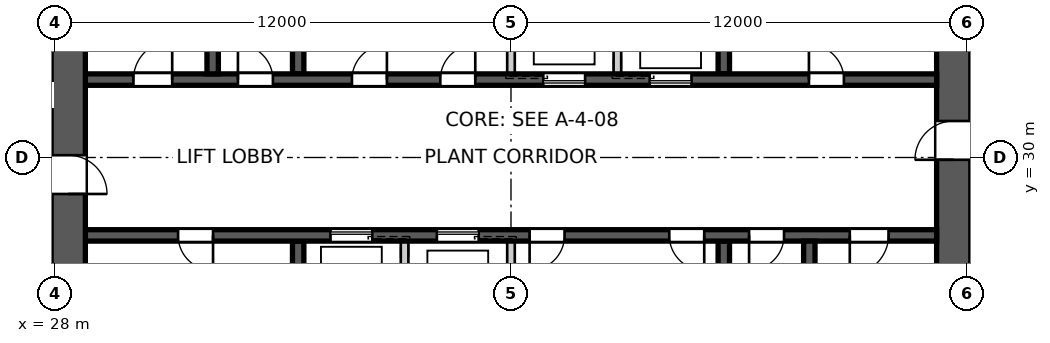
"""IFC4 building model, lengths in metres.
Left out: names, types, materials, properties, quantities, classifications, styles, units other than length and angle.
Written with IfcOpenShell. Run it as: python <this file> out.ifc"""

import sys

from ifc_helpers import new_model, si_unit, direction, frame, frame_2d, origin, place, context, subcontext, project, spatial, polyline, rectangle, outline, extrude, element, fill, save


model = new_model("IFC4")
c1 = context("Model", 3, precision=1e-05, world=origin(), true_north=direction((0.0, 1.0)))
c2 = subcontext(c1, "Body", "Model", "MODEL_VIEW")
j1 = project(units=[si_unit("LENGTHUNIT", "METRE"), si_unit("PLANEANGLEUNIT", "RADIAN")], contexts=[c1])
p1 = place(None, origin())
s1 = spatial("IfcSite", under=j1, at=p1, CompositionType="ELEMENT")
p2 = place(p1, origin())
s2 = spatial("IfcBuilding", under=s1, at=p2, CompositionType="ELEMENT")
p3 = place(p2, frame((0.0, 0.0, 235.4)))
s3 = spatial("IfcBuildingStorey", under=s2, at=p3, CompositionType="ELEMENT", Elevation=235.4)
p4 = place(p3, frame((51.65, 18.8, 0.0), z_axis=(0.0, 0.0, 1.0), x_axis=(0.0, 1.0, 0.0)))
e1 = element("IfcWall", 1, at=p4, inside=s3, PredefinedType="SHEAR", context=c2, shape_type="SweptSolid", body=[
    extrude(outline(polyline([(0.0, -0.45), (22.4, -0.45), (22.4, -0.025), (22.85, -0.025), (22.85, 0.025), (22.4, 0.025), (22.4, 0.45), (0.0, 0.45), (0.0, 0.025), (-0.45, 0.025), (-0.45, -0.025), (0.0, -0.025), (0.0, -0.45)])), origin(), (0.0, 0.0, 1.0), 5.0),
])
p5 = place(p4, frame((11.14, 0.0, 0.0)))
e2 = element("IfcOpeningElement", 2, at=p5, cuts=e1, PredefinedType="OPENING", context=c2, shape_type="SweptSolid", body=[
    extrude(rectangle(XDim=1.02, YDim=2.4, at=frame_2d((0.51, 1.2))), frame((0.0, 0.46, 0.0), z_axis=(0.0, -1.0, 0.0), x_axis=(1.0, 0.0, 0.0)), (0.0, 0.0, 1.0), 0.92),
])
p6 = place(p3, frame((28.35, 41.2, 0.0), z_axis=(0.0, 0.0, 1.0), x_axis=(0.0, -1.0, 0.0)))
e3 = element("IfcWall", 3, at=p6, inside=s3, PredefinedType="SHEAR", context=c2, shape_type="SweptSolid", body=[
    extrude(outline(polyline([(0.0, -0.45), (22.4, -0.45), (22.4, -0.025), (22.85, -0.025), (22.85, 0.025), (22.4, 0.025), (22.4, 0.45), (0.0, 0.45), (0.0, 0.025), (-0.45, 0.025), (-0.45, -0.025), (0.0, -0.025), (0.0, -0.45)])), origin(), (0.0, 0.0, 1.0), 5.0),
])
p7 = place(p6, frame((11.14, 0.0, 0.0)))
e4 = element("IfcOpeningElement", 4, at=p7, cuts=e3, PredefinedType="OPENING", context=c2, shape_type="SweptSolid", body=[
    extrude(rectangle(XDim=1.02, YDim=2.4, at=frame_2d((0.51, 1.2))), frame((0.0, 0.46, 0.0), z_axis=(0.0, -1.0, 0.0), x_axis=(1.0, 0.0, 0.0)), (0.0, 0.0, 1.0), 0.92),
])
p8 = place(p3, frame((28.8, 32.05, 0.0), z_axis=(0.0, 0.0, 1.0), x_axis=(1.0, 0.0, 0.0)))
e5 = element("IfcWall", 5, at=p8, inside=s3, PredefinedType="SHEAR", context=c2, shape_type="SweptSolid", body=[
    extrude(rectangle(XDim=22.4, YDim=0.3, at=frame_2d((11.2, 0.0))), origin(), (0.0, 0.0, 1.0), 5.0),
])
p9 = place(p8, frame((19.04, 0.0, 0.0)))
e6 = element("IfcOpeningElement", 6, at=p9, cuts=e5, PredefinedType="OPENING", context=c2, shape_type="SweptSolid", body=[
    extrude(rectangle(XDim=0.92, YDim=2.1, at=frame_2d((0.46, 1.05))), frame((0.0, 0.16, 0.0), z_axis=(0.0, -1.0, 0.0), x_axis=(1.0, 0.0, 0.0)), (0.0, 0.0, 1.0), 0.32),
])
p10 = place(p8, frame((1.265, 0.0, 0.0)))
e7 = element("IfcOpeningElement", 7, at=p10, cuts=e5, PredefinedType="OPENING", context=c2, shape_type="SweptSolid", body=[
    extrude(rectangle(XDim=1.02, YDim=2.1, at=frame_2d((0.51, 1.05))), frame((0.0, 0.16, 0.0), z_axis=(0.0, -1.0, 0.0), x_axis=(1.0, 0.0, 0.0)), (0.0, 0.0, 1.0), 0.32),
])
p11 = place(p8, frame((4.015, 0.0, 0.0)))
e8 = element("IfcOpeningElement", 8, at=p11, cuts=e5, PredefinedType="OPENING", context=c2, shape_type="SweptSolid", body=[
    extrude(rectangle(XDim=0.92, YDim=2.1, at=frame_2d((0.46, 1.05))), frame((0.0, 0.16, 0.0), z_axis=(0.0, -1.0, 0.0), x_axis=(1.0, 0.0, 0.0)), (0.0, 0.0, 1.0), 0.32),
])
p12 = place(p8, frame((7.015, 0.0, 0.0)))
e9 = element("IfcOpeningElement", 9, at=p12, cuts=e5, PredefinedType="OPENING", context=c2, shape_type="SweptSolid", body=[
    extrude(rectangle(XDim=0.92, YDim=2.1, at=frame_2d((0.46, 1.05))), frame((0.0, 0.16, 0.0), z_axis=(0.0, -1.0, 0.0), x_axis=(1.0, 0.0, 0.0)), (0.0, 0.0, 1.0), 0.32),
])
p13 = place(p8, frame((9.34, 0.0, 0.0)))
e10 = element("IfcOpeningElement", 10, at=p13, cuts=e5, PredefinedType="OPENING", context=c2, shape_type="SweptSolid", body=[
    extrude(rectangle(XDim=0.92, YDim=2.1, at=frame_2d((0.46, 1.05))), frame((0.0, 0.16, 0.0), z_axis=(0.0, -1.0, 0.0), x_axis=(1.0, 0.0, 0.0)), (0.0, 0.0, 1.0), 0.32),
])
p14 = place(p8, frame((12.05, 0.0, 0.0)))
e11 = element("IfcOpeningElement", 11, at=p14, cuts=e5, PredefinedType="OPENING", context=c2, shape_type="SweptSolid", body=[
    extrude(rectangle(XDim=1.1, YDim=2.1, at=frame_2d((0.55, 1.05))), frame((0.0, 0.16, 0.0), z_axis=(0.0, -1.0, 0.0), x_axis=(1.0, 0.0, 0.0)), (0.0, 0.0, 1.0), 0.32),
])
p15 = place(p8, frame((14.85, 0.0, 0.0)))
e12 = element("IfcOpeningElement", 12, at=p15, cuts=e5, PredefinedType="OPENING", context=c2, shape_type="SweptSolid", body=[
    extrude(rectangle(XDim=1.1, YDim=2.1, at=frame_2d((0.55, 1.05))), frame((0.0, 0.16, 0.0), z_axis=(0.0, -1.0, 0.0), x_axis=(1.0, 0.0, 0.0)), (0.0, 0.0, 1.0), 0.32),
])
p16 = place(p3, frame((51.2, 27.95, 0.0), z_axis=(0.0, 0.0, 1.0), x_axis=(-1.0, 0.0, 0.0)))
e13 = element("IfcWall", 13, at=p16, inside=s3, PredefinedType="SHEAR", context=c2, shape_type="SweptSolid", body=[
    extrude(rectangle(XDim=22.4, YDim=0.3, at=frame_2d((11.2, 0.0))), origin(), (0.0, 0.0, 1.0), 5.0),
])
p17 = place(p16, frame((19.04, 0.0, 0.0)))
e14 = element("IfcOpeningElement", 14, at=p17, cuts=e13, PredefinedType="OPENING", context=c2, shape_type="SweptSolid", body=[
    extrude(rectangle(XDim=0.92, YDim=2.1, at=frame_2d((0.46, 1.05))), frame((0.0, 0.16, 0.0), z_axis=(0.0, -1.0, 0.0), x_axis=(1.0, 0.0, 0.0)), (0.0, 0.0, 1.0), 0.32),
])
p18 = place(p16, frame((1.265, 0.0, 0.0)))
e15 = element("IfcOpeningElement", 15, at=p18, cuts=e13, PredefinedType="OPENING", context=c2, shape_type="SweptSolid", body=[
    extrude(rectangle(XDim=1.02, YDim=2.1, at=frame_2d((0.51, 1.05))), frame((0.0, 0.16, 0.0), z_axis=(0.0, -1.0, 0.0), x_axis=(1.0, 0.0, 0.0)), (0.0, 0.0, 1.0), 0.32),
])
p19 = place(p16, frame((4.015, 0.0, 0.0)))
e16 = element("IfcOpeningElement", 16, at=p19, cuts=e13, PredefinedType="OPENING", context=c2, shape_type="SweptSolid", body=[
    extrude(rectangle(XDim=0.92, YDim=2.1, at=frame_2d((0.46, 1.05))), frame((0.0, 0.16, 0.0), z_axis=(0.0, -1.0, 0.0), x_axis=(1.0, 0.0, 0.0)), (0.0, 0.0, 1.0), 0.32),
])
p20 = place(p16, frame((9.79, 0.0, 0.0)))
e17 = element("IfcOpeningElement", 17, at=p20, cuts=e13, PredefinedType="OPENING", context=c2, shape_type="SweptSolid", body=[
    extrude(rectangle(XDim=0.92, YDim=2.1, at=frame_2d((0.46, 1.05))), frame((0.0, 0.16, 0.0), z_axis=(0.0, -1.0, 0.0), x_axis=(1.0, 0.0, 0.0)), (0.0, 0.0, 1.0), 0.32),
])
p21 = place(p16, frame((6.115, 0.0, 0.0)))
e18 = element("IfcOpeningElement", 18, at=p21, cuts=e13, PredefinedType="OPENING", context=c2, shape_type="SweptSolid", body=[
    extrude(rectangle(XDim=0.92, YDim=2.1, at=frame_2d((0.46, 1.05))), frame((0.0, 0.16, 0.0), z_axis=(0.0, -1.0, 0.0), x_axis=(1.0, 0.0, 0.0)), (0.0, 0.0, 1.0), 0.32),
])
p22 = place(p16, frame((12.05, 0.0, 0.0)))
e19 = element("IfcOpeningElement", 19, at=p22, cuts=e13, PredefinedType="OPENING", context=c2, shape_type="SweptSolid", body=[
    extrude(rectangle(XDim=1.1, YDim=2.1, at=frame_2d((0.55, 1.05))), frame((0.0, 0.16, 0.0), z_axis=(0.0, -1.0, 0.0), x_axis=(1.0, 0.0, 0.0)), (0.0, 0.0, 1.0), 0.32),
])
p23 = place(p16, frame((14.85, 0.0, 0.0)))
e20 = element("IfcOpeningElement", 20, at=p23, cuts=e13, PredefinedType="OPENING", context=c2, shape_type="SweptSolid", body=[
    extrude(rectangle(XDim=1.1, YDim=2.1, at=frame_2d((0.55, 1.05))), frame((0.0, 0.16, 0.0), z_axis=(0.0, -1.0, 0.0), x_axis=(1.0, 0.0, 0.0)), (0.0, 0.0, 1.0), 0.32),
])
for number, where, z_axis, x_axis in (
    (21, (34.4, 32.2, 0.0), (0.0, 0.0, 1.0), (0.0, 1.0, 0.0)),
    (22, (45.6, 27.8, 0.0), (0.0, 0.0, 1.0), (0.0, -1.0, 0.0)),
):
    element("IfcWall", number, at=place(p3, frame(where, z_axis=z_axis, x_axis=x_axis)), inside=s3, PredefinedType="SHEAR", context=c2, shape_type="SweptSolid", body=[
        extrude(rectangle(XDim=2.8, YDim=0.3, at=frame_2d((1.4, 0.0))), origin(), (0.0, 0.0, 1.0), 5.0),
    ])
for number, where, z_axis, x_axis in (
    (23, (40.0, 32.2, 0.0), (0.0, 0.0, 1.0), (0.0, 1.0, 0.0)),
    (24, (40.0, 27.8, 0.0), (0.0, 0.0, 1.0), (0.0, -1.0, 0.0)),
    (25, (42.8, 32.2, 0.0), (0.0, 0.0, 1.0), (0.0, 1.0, 0.0)),
    (26, (37.2, 27.8, 0.0), (0.0, 0.0, 1.0), (0.0, -1.0, 0.0)),
):
    element("IfcWall", number, at=place(p3, frame(where, z_axis=z_axis, x_axis=x_axis)), inside=s3, PredefinedType="SOLIDWALL", context=c2, shape_type="SweptSolid", body=[
        extrude(rectangle(XDim=2.8, YDim=0.2, at=frame_2d((1.4, 0.0))), origin(), (0.0, 0.0, 1.0), 5.0),
    ])
for number, where, z_axis, x_axis in (
    (27, (45.6, 32.2, 0.0), (0.0, 0.0, 1.0), (0.0, 1.0, 0.0)),
    (28, (34.4, 27.8, 0.0), (0.0, 0.0, 1.0), (0.0, -1.0, 0.0)),
):
    element("IfcWall", number, at=place(p3, frame(where, z_axis=z_axis, x_axis=x_axis)), inside=s3, PredefinedType="SHEAR", context=c2, shape_type="SweptSolid", body=[
        extrude(rectangle(XDim=2.8, YDim=0.3, at=frame_2d((1.4, 0.0))), origin(), (0.0, 0.0, 1.0), 5.0),
    ])
for number, where, z_axis, x_axis in (
    (29, (32.15, 32.2, 0.0), (0.0, 0.0, 1.0), (0.0, 1.0, 0.0)),
    (30, (47.85, 27.8, 0.0), (0.0, 0.0, 1.0), (0.0, -1.0, 0.0)),
):
    element("IfcWall", number, at=place(p3, frame(where, z_axis=z_axis, x_axis=x_axis)), inside=s3, PredefinedType="SHEAR", context=c2, shape_type="SweptSolid", body=[
        extrude(rectangle(XDim=7.7, YDim=0.3, at=frame_2d((3.85, 0.0))), origin(), (0.0, 0.0, 1.0), 5.0),
    ])
p24 = place(p9, origin())
e31 = element("IfcDoor", 31, at=p24, inside=s3, OperationType="SINGLE_SWING_LEFT", PredefinedType="DOOR", context=c2, shape_type="SweptSolid", body=[
    extrude(rectangle(XDim=0.92, YDim=2.1, at=frame_2d((0.46, 1.05))), frame((0.0, 0.025, 0.0), z_axis=(0.0, -1.0, 0.0), x_axis=(1.0, 0.0, 0.0)), (0.0, 0.0, 1.0), 0.05),
])
fill(e6, e31)
p25 = place(p17, origin())
e32 = element("IfcDoor", 32, at=p25, inside=s3, OperationType="SINGLE_SWING_LEFT", PredefinedType="DOOR", context=c2, shape_type="SweptSolid", body=[
    extrude(rectangle(XDim=0.92, YDim=2.1, at=frame_2d((0.46, 1.05))), frame((0.0, 0.025, 0.0), z_axis=(0.0, -1.0, 0.0), x_axis=(1.0, 0.0, 0.0)), (0.0, 0.0, 1.0), 0.05),
])
fill(e14, e32)
p26 = place(p18, origin())
e33 = element("IfcDoor", 33, at=p26, inside=s3, OperationType="SINGLE_SWING_RIGHT", PredefinedType="DOOR", context=c2, shape_type="SweptSolid", body=[
    extrude(rectangle(XDim=1.02, YDim=2.1, at=frame_2d((0.51, 1.05))), frame((0.0, 0.025, 0.0), z_axis=(0.0, -1.0, 0.0), x_axis=(1.0, 0.0, 0.0)), (0.0, 0.0, 1.0), 0.05),
])
fill(e15, e33)
p27 = place(p10, origin())
e34 = element("IfcDoor", 34, at=p27, inside=s3, OperationType="SINGLE_SWING_RIGHT", PredefinedType="DOOR", context=c2, shape_type="SweptSolid", body=[
    extrude(rectangle(XDim=1.02, YDim=2.1, at=frame_2d((0.51, 1.05))), frame((0.0, 0.025, 0.0), z_axis=(0.0, -1.0, 0.0), x_axis=(1.0, 0.0, 0.0)), (0.0, 0.0, 1.0), 0.05),
])
fill(e7, e34)
p28 = place(p11, origin())
e35 = element("IfcDoor", 35, at=p28, inside=s3, OperationType="SINGLE_SWING_LEFT", PredefinedType="DOOR", context=c2, shape_type="SweptSolid", body=[
    extrude(rectangle(XDim=0.92, YDim=2.1, at=frame_2d((0.46, 1.05))), frame((0.0, 0.025, 0.0), z_axis=(0.0, -1.0, 0.0), x_axis=(1.0, 0.0, 0.0)), (0.0, 0.0, 1.0), 0.05),
])
fill(e8, e35)
p29 = place(p19, origin())
e36 = element("IfcDoor", 36, at=p29, inside=s3, OperationType="SINGLE_SWING_RIGHT", PredefinedType="DOOR", context=c2, shape_type="SweptSolid", body=[
    extrude(rectangle(XDim=0.92, YDim=2.1, at=frame_2d((0.46, 1.05))), frame((0.0, 0.025, 0.0), z_axis=(0.0, -1.0, 0.0), x_axis=(1.0, 0.0, 0.0)), (0.0, 0.0, 1.0), 0.05),
])
fill(e16, e36)
p30 = place(p12, origin())
e37 = element("IfcDoor", 37, at=p30, inside=s3, OperationType="SINGLE_SWING_RIGHT", PredefinedType="DOOR", context=c2, shape_type="SweptSolid", body=[
    extrude(rectangle(XDim=0.92, YDim=2.1, at=frame_2d((0.46, 1.05))), frame((0.0, 0.025, 0.0), z_axis=(0.0, -1.0, 0.0), x_axis=(1.0, 0.0, 0.0)), (0.0, 0.0, 1.0), 0.05),
])
fill(e9, e37)
p31 = place(p13, origin())
e38 = element("IfcDoor", 38, at=p31, inside=s3, OperationType="SINGLE_SWING_RIGHT", PredefinedType="DOOR", context=c2, shape_type="SweptSolid", body=[
    extrude(rectangle(XDim=0.92, YDim=2.1, at=frame_2d((0.46, 1.05))), frame((0.0, 0.025, 0.0), z_axis=(0.0, -1.0, 0.0), x_axis=(1.0, 0.0, 0.0)), (0.0, 0.0, 1.0), 0.05),
])
fill(e10, e38)
p32 = place(p20, origin())
e39 = element("IfcDoor", 39, at=p32, inside=s3, OperationType="SINGLE_SWING_RIGHT", PredefinedType="DOOR", context=c2, shape_type="SweptSolid", body=[
    extrude(rectangle(XDim=0.92, YDim=2.1, at=frame_2d((0.46, 1.05))), frame((0.0, 0.025, 0.0), z_axis=(0.0, -1.0, 0.0), x_axis=(1.0, 0.0, 0.0)), (0.0, 0.0, 1.0), 0.05),
])
fill(e17, e39)
p33 = place(p21, origin())
e40 = element("IfcDoor", 40, at=p33, inside=s3, OperationType="SINGLE_SWING_LEFT", PredefinedType="DOOR", context=c2, shape_type="SweptSolid", body=[
    extrude(rectangle(XDim=0.92, YDim=2.1, at=frame_2d((0.46, 1.05))), frame((0.0, 0.025, 0.0), z_axis=(0.0, -1.0, 0.0), x_axis=(1.0, 0.0, 0.0)), (0.0, 0.0, 1.0), 0.05),
])
fill(e18, e40)
p34 = place(p5, origin())
e41 = element("IfcDoor", 41, at=p34, inside=s3, OperationType="SINGLE_SWING_LEFT", PredefinedType="DOOR", context=c2, shape_type="SweptSolid", body=[
    extrude(rectangle(XDim=1.02, YDim=2.4, at=frame_2d((0.51, 1.2))), frame((0.0, 0.025, 0.0), z_axis=(0.0, -1.0, 0.0), x_axis=(1.0, 0.0, 0.0)), (0.0, 0.0, 1.0), 0.05),
])
fill(e2, e41)
p35 = place(p7, origin())
e42 = element("IfcDoor", 42, at=p35, inside=s3, OperationType="SINGLE_SWING_RIGHT", PredefinedType="DOOR", context=c2, shape_type="SweptSolid", body=[
    extrude(rectangle(XDim=1.02, YDim=2.4, at=frame_2d((0.51, 1.2))), frame((0.0, 0.025, 0.0), z_axis=(0.0, -1.0, 0.0), x_axis=(1.0, 0.0, 0.0)), (0.0, 0.0, 1.0), 0.05),
])
fill(e4, e42)
p36 = place(p14, origin())
e43 = element("IfcDoor", 43, at=p36, inside=s3, OperationType="SLIDING_TO_LEFT", PredefinedType="DOOR", context=c2, shape_type="SweptSolid", body=[
    extrude(rectangle(XDim=1.1, YDim=2.1, at=frame_2d((0.55, 1.05))), frame((0.0, 0.025, 0.0), z_axis=(0.0, -1.0, 0.0), x_axis=(1.0, 0.0, 0.0)), (0.0, 0.0, 1.0), 0.05),
])
fill(e11, e43)
p37 = place(p22, origin())
e44 = element("IfcDoor", 44, at=p37, inside=s3, OperationType="SLIDING_TO_LEFT", PredefinedType="DOOR", context=c2, shape_type="SweptSolid", body=[
    extrude(rectangle(XDim=1.1, YDim=2.1, at=frame_2d((0.55, 1.05))), frame((0.0, 0.025, 0.0), z_axis=(0.0, -1.0, 0.0), x_axis=(1.0, 0.0, 0.0)), (0.0, 0.0, 1.0), 0.05),
])
fill(e19, e44)
p38 = place(p15, origin())
e45 = element("IfcDoor", 45, at=p38, inside=s3, OperationType="SLIDING_TO_LEFT", PredefinedType="DOOR", context=c2, shape_type="SweptSolid", body=[
    extrude(rectangle(XDim=1.1, YDim=2.1, at=frame_2d((0.55, 1.05))), frame((0.0, 0.025, 0.0), z_axis=(0.0, -1.0, 0.0), x_axis=(1.0, 0.0, 0.0)), (0.0, 0.0, 1.0), 0.05),
])
fill(e12, e45)
p39 = place(p23, origin())
e46 = element("IfcDoor", 46, at=p39, inside=s3, OperationType="SLIDING_TO_LEFT", PredefinedType="DOOR", context=c2, shape_type="SweptSolid", body=[
    extrude(rectangle(XDim=1.1, YDim=2.1, at=frame_2d((0.55, 1.05))), frame((0.0, 0.025, 0.0), z_axis=(0.0, -1.0, 0.0), x_axis=(1.0, 0.0, 0.0)), (0.0, 0.0, 1.0), 0.05),
])
fill(e20, e46)
save(model, sys.argv[1])
